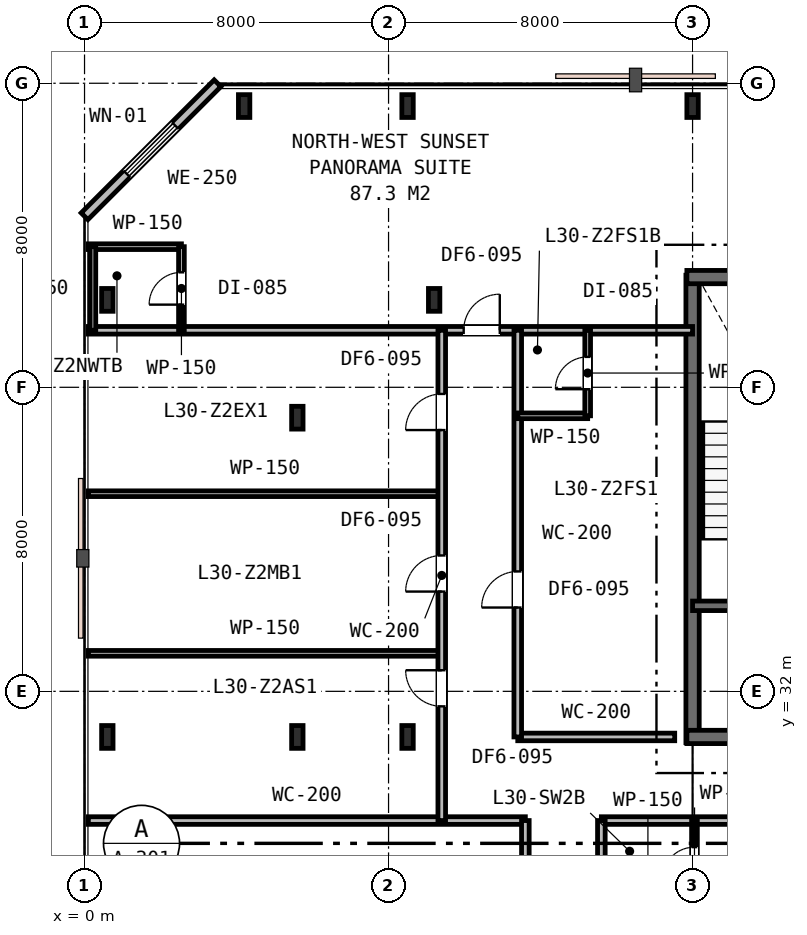
"""IFC4 building model, lengths in metres.
Left out: names, types, materials, properties, quantities, classifications, styles, units other than length and angle.
Written with IfcOpenShell. Run it as: python <this file> out.ifc"""

import sys

from ifc_helpers import new_model, si_unit, direction, frame, frame_2d, origin, origin_2d, place, context, subcontext, project, spatial, rectangle, i_section, extrude, element, fill, save


model = new_model("IFC4")
c1 = context("Model", 3, precision=1e-05, world=origin(), true_north=direction((0.0, 1.0)))
c2 = subcontext(c1, "Body", "Model", "MODEL_VIEW")
j1 = project(units=[si_unit("LENGTHUNIT", "METRE"), si_unit("PLANEANGLEUNIT", "RADIAN")], contexts=[c1])
p1 = place(None, origin())
s1 = spatial("IfcSite", under=j1, at=p1, CompositionType="ELEMENT")
p2 = place(p1, origin())
s2 = spatial("IfcBuilding", under=s1, at=p2, CompositionType="ELEMENT")
p3 = place(p2, frame((0.0, 0.0, 118.8)))
s3 = spatial("IfcBuildingStorey", under=s2, at=p3, CompositionType="ELEMENT", Elevation=118.8)
p4 = place(p3, frame((16.0, 30.65, 0.0), z_axis=(0.0, 0.0, 1.0), x_axis=(0.0, 1.0, 0.0)))
e1 = element("IfcWall", 1, at=p4, inside=s3, PredefinedType="SHEAR", context=c2, shape_type="SweptSolid", body=[
    extrude(rectangle(XDim=12.3, YDim=0.35, at=frame_2d((6.15, 0.0))), origin(), (0.0, 0.0, 1.0), 3.6),
])
p5 = place(p3, frame((15.85, 42.9, 0.0), z_axis=(0.0, 0.0, 1.0), x_axis=(1.0, 0.0, 0.0)))
e2 = element("IfcWall", 2, at=p5, inside=s3, PredefinedType="SHEAR", context=c2, shape_type="SweptSolid", body=[
    extrude(rectangle(XDim=24.3, YDim=0.35, at=frame_2d((12.15, 0.0))), origin(), (0.0, 0.0, 1.0), 3.6),
])
p6 = place(p3, frame((15.85, 30.8, 0.0), z_axis=(0.0, 0.0, 1.0), x_axis=(1.0, 0.0, 0.0)))
e3 = element("IfcWall", 3, at=p6, inside=s3, PredefinedType="SHEAR", context=c2, shape_type="SweptSolid", body=[
    extrude(rectangle(XDim=11.2, YDim=0.35, at=frame_2d((5.6, 0.0))), origin(), (0.0, 0.0, 1.0), 3.6),
])
p7 = place(p6, frame((2.45, 0.0, 0.0)))
e4 = element("IfcOpeningElement", 4, at=p7, cuts=e3, PredefinedType="OPENING", context=c2, shape_type="SweptSolid", body=[
    extrude(rectangle(XDim=1.1, YDim=2.15, at=frame_2d((0.55, 1.075))), frame((0.0, 0.185, 0.0), z_axis=(0.0, -1.0, 0.0), x_axis=(1.0, 0.0, 0.0)), (0.0, 0.0, 1.0), 0.37),
])
p8 = place(p3, frame((16.0, 34.25, 0.0), z_axis=(0.0, 0.0, 1.0), x_axis=(1.0, 0.0, 0.0)))
e5 = element("IfcWall", 5, at=p8, inside=s3, PredefinedType="SHEAR", context=c2, shape_type="SweptSolid", body=[
    extrude(rectangle(XDim=6.05, YDim=0.25, at=frame_2d((3.025, 0.0))), origin(), (0.0, 0.0, 1.0), 3.6),
])
p9 = place(p8, frame((1.25, 0.0, 0.0)))
e6 = element("IfcOpeningElement", 6, at=p9, cuts=e5, PredefinedType="OPENING", context=c2, shape_type="SweptSolid", body=[
    extrude(rectangle(XDim=1.0, YDim=2.15, at=frame_2d((0.5, 1.075))), frame((0.0, 0.135, 0.0), z_axis=(0.0, -1.0, 0.0), x_axis=(1.0, 0.0, 0.0)), (0.0, 0.0, 1.0), 0.27),
])
p10 = place(p8, frame((4.2, 0.0, 0.0)))
e7 = element("IfcOpeningElement", 7, at=p10, cuts=e5, PredefinedType="OPENING", context=c2, shape_type="SweptSolid", body=[
    extrude(rectangle(XDim=1.1, YDim=2.15, at=frame_2d((0.55, 1.075))), frame((0.0, 0.135, 0.0), z_axis=(0.0, -1.0, 0.0), x_axis=(1.0, 0.0, 0.0)), (0.0, 0.0, 1.0), 0.27),
])
for number, where, z_axis, x_axis in (
    (8, (5.6, 30.8, 0.0), (0.0, 0.0, 1.0), (1.0, 0.0, 0.0)),
    (9, (5.6, 39.2, 0.0), (0.0, 0.0, 1.0), (1.0, 0.0, 0.0)),
    (10, (8.5, 30.8, 0.0), (0.0, 0.0, 1.0), (1.0, 0.0, 0.0)),
    (11, (9.2, 42.3, 0.0), (0.0, 0.0, 1.0), (1.0, 0.0, 0.0)),
    (12, (0.6, 30.8, 0.0), (0.0, 0.0, 1.0), (1.0, 0.0, 0.0)),
    (13, (0.6, 42.3, 0.0), (0.0, 0.0, 1.0), (1.0, 0.0, 0.0)),
    (14, (4.2, 47.4, 0.0), (0.0, 0.0, 1.0), (1.0, 0.0, 0.0)),
    (15, (8.5, 47.4, 0.0), (0.0, 0.0, 1.0), (1.0, 0.0, 0.0)),
    (16, (16.0, 47.4, 0.0), (0.0, 0.0, 1.0), (1.0, 0.0, 0.0)),
):
    element("IfcColumn", number, at=place(p3, frame(where, z_axis=z_axis, x_axis=x_axis)), inside=s3, PredefinedType="COLUMN", context=c2, shape_type="SweptSolid", body=[
        extrude(i_section(OverallWidth=0.3, OverallDepth=0.6, WebThickness=0.015, FlangeThickness=0.03, FilletRadius=0.027, at=origin_2d()), origin(), (0.0, 0.0, 1.0), 3.6),
    ])
p11 = place(p3, frame((3.5, 48.0, 0.0), z_axis=(0.0, 0.0, 1.0), x_axis=(-0.707106781187, -0.707106781187, 0.0)))
e17 = element("IfcWall", 17, at=p11, inside=s3, PredefinedType="STANDARD", context=c2, shape_type="SweptSolid", body=[
    extrude(rectangle(XDim=4.95, YDim=0.25, at=frame_2d((2.475, 0.0))), origin(), (0.0, 0.0, 1.0), 3.33),
])
p12 = place(p11, frame((1.575, 0.0, 0.75)))
e18 = element("IfcOpeningElement", 18, at=p12, cuts=e17, PredefinedType="OPENING", context=c2, shape_type="SweptSolid", body=[
    extrude(rectangle(XDim=1.8, YDim=1.85, at=frame_2d((0.9, 0.925))), frame((0.0, 0.135, 0.0), z_axis=(0.0, -1.0, 0.0), x_axis=(1.0, 0.0, 0.0)), (0.0, 0.0, 1.0), 0.27),
])
p13 = place(p3, frame((0.1, 28.6, 0.0), z_axis=(0.0, 0.0, 1.0), x_axis=(1.0, 0.0, 0.0)))
e19 = element("IfcWall", 19, at=p13, inside=s3, PredefinedType="PARTITIONING", context=c2, shape_type="SweptSolid", body=[
    extrude(rectangle(XDim=11.5, YDim=0.2, at=frame_2d((5.75, 0.0))), origin(), (0.0, 0.0, 1.0), 2.87),
])
p14 = place(p3, frame((13.6, 28.6, 0.0), z_axis=(0.0, 0.0, 1.0), x_axis=(1.0, 0.0, 0.0)))
e20 = element("IfcWall", 20, at=p14, inside=s3, PredefinedType="PARTITIONING", context=c2, shape_type="SweptSolid", body=[
    extrude(rectangle(XDim=30.6, YDim=0.2, at=frame_2d((15.3, 0.0))), origin(), (0.0, 0.0, 1.0), 2.87),
])
p15 = place(p14, frame((13.325, 0.0, 0.0)))
e21 = element("IfcOpeningElement", 21, at=p15, cuts=e20, PredefinedType="OPENING", context=c2, shape_type="SweptSolid", body=[
    extrude(rectangle(XDim=0.95, YDim=2.15, at=frame_2d((0.475, 1.075))), frame((0.0, 0.11, 0.0), z_axis=(0.0, -1.0, 0.0), x_axis=(1.0, 0.0, 0.0)), (0.0, 0.0, 1.0), 0.22),
])
p16 = place(p14, frame((18.761, 0.0, 0.0)))
e22 = element("IfcOpeningElement", 22, at=p16, cuts=e20, PredefinedType="OPENING", context=c2, shape_type="SweptSolid", body=[
    extrude(rectangle(XDim=0.95, YDim=2.15, at=frame_2d((0.475, 1.075))), frame((0.0, 0.11, 0.0), z_axis=(0.0, -1.0, 0.0), x_axis=(1.0, 0.0, 0.0)), (0.0, 0.0, 1.0), 0.22),
])
p17 = place(p14, frame((25.503, 0.0, 0.0)))
e23 = element("IfcOpeningElement", 23, at=p17, cuts=e20, PredefinedType="OPENING", context=c2, shape_type="SweptSolid", body=[
    extrude(rectangle(XDim=0.95, YDim=2.15, at=frame_2d((0.475, 1.075))), frame((0.0, 0.11, 0.0), z_axis=(0.0, -1.0, 0.0), x_axis=(1.0, 0.0, 0.0)), (0.0, 0.0, 1.0), 0.22),
])
p18 = place(p3, frame((11.4, 30.8, 0.0), z_axis=(0.0, 0.0, 1.0), x_axis=(1.0, 0.0, 0.0)))
e24 = element("IfcWall", 24, at=p18, inside=s3, PredefinedType="PARTITIONING", context=c2, shape_type="SweptSolid", body=[
    extrude(rectangle(XDim=4.13, YDim=0.2, at=frame_2d((2.065, 0.0))), origin(), (0.0, 0.0, 1.0), 2.87),
])
p19 = place(p3, frame((11.6, 10.6, 0.0), z_axis=(0.0, 0.0, 1.0), x_axis=(0.0, 1.0, 0.0)))
e25 = element("IfcWall", 25, at=p19, inside=s3, PredefinedType="PARTITIONING", context=c2, shape_type="SweptSolid", body=[
    extrude(rectangle(XDim=18.0, YDim=0.2, at=frame_2d((9.0, 0.0))), origin(), (0.0, 0.0, 1.0), 2.87),
])
p20 = place(p19, frame((8.425, 0.0, 0.0)))
e26 = element("IfcOpeningElement", 26, at=p20, cuts=e25, PredefinedType="OPENING", context=c2, shape_type="SweptSolid", body=[
    extrude(rectangle(XDim=0.95, YDim=2.15, at=frame_2d((0.475, 1.075))), frame((0.0, 0.11, 0.0), z_axis=(0.0, -1.0, 0.0), x_axis=(1.0, 0.0, 0.0)), (0.0, 0.0, 1.0), 0.22),
])
p21 = place(p19, frame((13.725, 0.0, 0.0)))
e27 = element("IfcOpeningElement", 27, at=p21, cuts=e25, PredefinedType="OPENING", context=c2, shape_type="SweptSolid", body=[
    extrude(rectangle(XDim=0.95, YDim=2.15, at=frame_2d((0.475, 1.075))), frame((0.0, 0.11, 0.0), z_axis=(0.0, -1.0, 0.0), x_axis=(1.0, 0.0, 0.0)), (0.0, 0.0, 1.0), 0.22),
])
p22 = place(p19, frame((3.225, 0.0, 0.0)))
e28 = element("IfcOpeningElement", 28, at=p22, cuts=e25, PredefinedType="OPENING", context=c2, shape_type="SweptSolid", body=[
    extrude(rectangle(XDim=0.95, YDim=2.15, at=frame_2d((0.475, 1.075))), frame((0.0, 0.11, 0.0), z_axis=(0.0, -1.0, 0.0), x_axis=(1.0, 0.0, 0.0)), (0.0, 0.0, 1.0), 0.22),
])
p23 = place(p3, frame((0.1, 41.5, 0.0), z_axis=(0.0, 0.0, 1.0), x_axis=(1.0, 0.0, 0.0)))
e29 = element("IfcWall", 29, at=p23, inside=s3, PredefinedType="PARTITIONING", context=c2, shape_type="SweptSolid", body=[
    extrude(rectangle(XDim=15.9, YDim=0.2, at=frame_2d((7.95, 0.0))), origin(), (0.0, 0.0, 1.0), 2.87),
])
p24 = place(p23, frame((9.877, 0.0, 0.0)))
e30 = element("IfcOpeningElement", 30, at=p24, cuts=e29, PredefinedType="OPENING", context=c2, shape_type="SweptSolid", body=[
    extrude(rectangle(XDim=0.95, YDim=2.15, at=frame_2d((0.475, 1.075))), frame((0.0, 0.11, 0.0), z_axis=(0.0, -1.0, 0.0), x_axis=(1.0, 0.0, 0.0)), (0.0, 0.0, 1.0), 0.22),
])
p25 = place(p3, frame((0.1, 43.7, 0.0), z_axis=(0.0, 0.0, 1.0), x_axis=(1.0, 0.0, 0.0)))
e31 = element("IfcWall", 31, at=p25, inside=s3, PredefinedType="PARTITIONING", context=c2, shape_type="SweptSolid", body=[
    extrude(rectangle(XDim=2.45, YDim=0.15, at=frame_2d((1.225, 0.0))), origin(), (0.0, 0.0, 1.0), 3.33),
])
p26 = place(p3, frame((2.55, 41.5, 0.0), z_axis=(0.0, 0.0, 1.0), x_axis=(0.0, 1.0, 0.0)))
e32 = element("IfcWall", 32, at=p26, inside=s3, PredefinedType="PARTITIONING", context=c2, shape_type="SweptSolid", body=[
    extrude(rectangle(XDim=2.2, YDim=0.15, at=frame_2d((1.1, 0.0))), origin(), (0.0, 0.0, 1.0), 2.87),
])
p27 = place(p26, frame((0.675, 0.0, 0.0)))
e33 = element("IfcOpeningElement", 33, at=p27, cuts=e32, PredefinedType="OPENING", context=c2, shape_type="SweptSolid", body=[
    extrude(rectangle(XDim=0.85, YDim=2.15, at=frame_2d((0.425, 1.075))), frame((0.0, 0.085, 0.0), z_axis=(0.0, -1.0, 0.0), x_axis=(1.0, 0.0, 0.0)), (0.0, 0.0, 1.0), 0.17),
])
p28 = place(p3, frame((0.22, 41.5, 0.0), z_axis=(0.0, 0.0, 1.0), x_axis=(0.0, 1.0, 0.0)))
e34 = element("IfcWall", 34, at=p28, inside=s3, PredefinedType="PARTITIONING", context=c2, shape_type="SweptSolid", body=[
    extrude(rectangle(XDim=2.2, YDim=0.15, at=frame_2d((1.1, 0.0))), origin(), (0.0, 0.0, 1.0), 2.87),
])
for number, where, z_axis, x_axis in (
    (35, (0.1, 33.0, 0.0), (0.0, 0.0, 1.0), (1.0, 0.0, 0.0)),
    (36, (0.1, 37.2, 0.0), (0.0, 0.0, 1.0), (1.0, 0.0, 0.0)),
):
    element("IfcWall", number, at=place(p3, frame(where, z_axis=z_axis, x_axis=x_axis)), inside=s3, PredefinedType="PARTITIONING", context=c2, shape_type="SweptSolid", body=[
        extrude(rectangle(XDim=9.3, YDim=0.15, at=frame_2d((4.65, 0.0))), origin(), (0.0, 0.0, 1.0), 2.87),
    ])
p29 = place(p3, frame((9.4, 28.6, 0.0), z_axis=(0.0, 0.0, 1.0), x_axis=(0.0, 1.0, 0.0)))
e37 = element("IfcWall", 37, at=p29, inside=s3, PredefinedType="PARTITIONING", context=c2, shape_type="SweptSolid", body=[
    extrude(rectangle(XDim=12.9, YDim=0.2, at=frame_2d((6.45, 0.0))), origin(), (0.0, 0.0, 1.0), 2.87),
])
p30 = place(p29, frame((3.005, 0.0, 0.0)))
e38 = element("IfcOpeningElement", 38, at=p30, cuts=e37, PredefinedType="OPENING", context=c2, shape_type="SweptSolid", body=[
    extrude(rectangle(XDim=0.95, YDim=2.15, at=frame_2d((0.475, 1.075))), frame((0.0, 0.11, 0.0), z_axis=(0.0, -1.0, 0.0), x_axis=(1.0, 0.0, 0.0)), (0.0, 0.0, 1.0), 0.22),
])
p31 = place(p29, frame((6.025, 0.0, 0.0)))
e39 = element("IfcOpeningElement", 39, at=p31, cuts=e37, PredefinedType="OPENING", context=c2, shape_type="SweptSolid", body=[
    extrude(rectangle(XDim=0.95, YDim=2.15, at=frame_2d((0.475, 1.075))), frame((0.0, 0.11, 0.0), z_axis=(0.0, -1.0, 0.0), x_axis=(1.0, 0.0, 0.0)), (0.0, 0.0, 1.0), 0.22),
])
p32 = place(p29, frame((10.275, 0.0, 0.0)))
e40 = element("IfcOpeningElement", 40, at=p32, cuts=e37, PredefinedType="OPENING", context=c2, shape_type="SweptSolid", body=[
    extrude(rectangle(XDim=0.95, YDim=2.15, at=frame_2d((0.475, 1.075))), frame((0.0, 0.11, 0.0), z_axis=(0.0, -1.0, 0.0), x_axis=(1.0, 0.0, 0.0)), (0.0, 0.0, 1.0), 0.22),
])
p33 = place(p3, frame((11.4, 30.8, 0.0), z_axis=(0.0, 0.0, 1.0), x_axis=(0.0, 1.0, 0.0)))
e41 = element("IfcWall", 41, at=p33, inside=s3, PredefinedType="PARTITIONING", context=c2, shape_type="SweptSolid", body=[
    extrude(rectangle(XDim=10.7, YDim=0.2, at=frame_2d((5.35, 0.0))), origin(), (0.0, 0.0, 1.0), 2.87),
])
p34 = place(p33, frame((3.405, 0.0, 0.0)))
e42 = element("IfcOpeningElement", 42, at=p34, cuts=e41, PredefinedType="OPENING", context=c2, shape_type="SweptSolid", body=[
    extrude(rectangle(XDim=0.95, YDim=2.15, at=frame_2d((0.475, 1.075))), frame((0.0, 0.11, 0.0), z_axis=(0.0, -1.0, 0.0), x_axis=(1.0, 0.0, 0.0)), (0.0, 0.0, 1.0), 0.22),
])
p35 = place(p3, frame((11.4, 39.25, 0.0), z_axis=(0.0, 0.0, 1.0), x_axis=(1.0, 0.0, 0.0)))
e43 = element("IfcWall", 43, at=p35, inside=s3, PredefinedType="PARTITIONING", context=c2, shape_type="SweptSolid", body=[
    extrude(rectangle(XDim=1.84, YDim=0.15, at=frame_2d((0.92, 0.0))), origin(), (0.0, 0.0, 1.0), 3.33),
])
p36 = place(p3, frame((13.24, 39.25, 0.0), z_axis=(0.0, 0.0, 1.0), x_axis=(0.0, 1.0, 0.0)))
e44 = element("IfcWall", 44, at=p36, inside=s3, PredefinedType="PARTITIONING", context=c2, shape_type="SweptSolid", body=[
    extrude(rectangle(XDim=2.25, YDim=0.15, at=frame_2d((1.125, 0.0))), origin(), (0.0, 0.0, 1.0), 3.33),
])
p37 = place(p36, frame((0.7, 0.0, 0.0)))
e45 = element("IfcOpeningElement", 45, at=p37, cuts=e44, PredefinedType="OPENING", context=c2, shape_type="SweptSolid", body=[
    extrude(rectangle(XDim=0.85, YDim=2.15, at=frame_2d((0.425, 1.075))), frame((0.0, 0.085, 0.0), z_axis=(0.0, -1.0, 0.0), x_axis=(1.0, 0.0, 0.0)), (0.0, 0.0, 1.0), 0.17),
])
p38 = place(p3, frame((13.6, 10.6, 0.0), z_axis=(0.0, 0.0, 1.0), x_axis=(0.0, 1.0, 0.0)))
e46 = element("IfcWall", 46, at=p38, inside=s3, PredefinedType="PARTITIONING", context=c2, shape_type="SweptSolid", body=[
    extrude(rectangle(XDim=18.0, YDim=0.2, at=frame_2d((9.0, 0.0))), origin(), (0.0, 0.0, 1.0), 2.87),
])
p39 = place(p38, frame((4.24, 0.0, 0.0)))
e47 = element("IfcOpeningElement", 47, at=p39, cuts=e46, PredefinedType="OPENING", context=c2, shape_type="SweptSolid", body=[
    extrude(rectangle(XDim=0.95, YDim=2.15, at=frame_2d((0.475, 1.075))), frame((0.0, 0.11, 0.0), z_axis=(0.0, -1.0, 0.0), x_axis=(1.0, 0.0, 0.0)), (0.0, 0.0, 1.0), 0.22),
])
p40 = place(p38, frame((11.494, 0.0, 0.0)))
e48 = element("IfcOpeningElement", 48, at=p40, cuts=e46, PredefinedType="OPENING", context=c2, shape_type="SweptSolid", body=[
    extrude(rectangle(XDim=0.95, YDim=2.15, at=frame_2d((0.475, 1.075))), frame((0.0, 0.11, 0.0), z_axis=(0.0, -1.0, 0.0), x_axis=(1.0, 0.0, 0.0)), (0.0, 0.0, 1.0), 0.22),
])
p41 = place(p3, frame((16.05, 26.35, 0.0), z_axis=(0.0, 0.0, 1.0), x_axis=(0.0, 1.0, 0.0)))
e49 = element("IfcWall", 49, at=p41, inside=s3, PredefinedType="PARTITIONING", context=c2, shape_type="SweptSolid", body=[
    extrude(rectangle(XDim=2.25, YDim=0.15, at=frame_2d((1.125, 0.0))), origin(), (0.0, 0.0, 1.0), 2.87),
])
p42 = place(p41, frame((0.7, 0.0, 0.0)))
e50 = element("IfcOpeningElement", 50, at=p42, cuts=e49, PredefinedType="OPENING", context=c2, shape_type="SweptSolid", body=[
    extrude(rectangle(XDim=0.85, YDim=2.15, at=frame_2d((0.425, 1.075))), frame((0.0, 0.085, 0.0), z_axis=(0.0, -1.0, 0.0), x_axis=(1.0, 0.0, 0.0)), (0.0, 0.0, 1.0), 0.17),
])
p43 = place(p12, origin())
e51 = element("IfcWindow", 51, at=p43, inside=s3, PartitioningType="SINGLE_PANEL", PredefinedType="WINDOW", context=c2, shape_type="SweptSolid", body=[
    extrude(rectangle(XDim=1.8, YDim=1.85, at=frame_2d((0.9, 0.925))), frame((0.0, 0.03, 0.0), z_axis=(0.0, -1.0, 0.0), x_axis=(1.0, 0.0, 0.0)), (0.0, 0.0, 1.0), 0.06),
])
fill(e18, e51)
p44 = place(p24, origin())
e52 = element("IfcDoor", 52, at=p44, inside=s3, OperationType="SINGLE_SWING_RIGHT", PredefinedType="DOOR", context=c2, shape_type="SweptSolid", body=[
    extrude(rectangle(XDim=0.95, YDim=2.15, at=frame_2d((0.475, 1.075))), frame((0.0, 0.025, 0.0), z_axis=(0.0, -1.0, 0.0), x_axis=(1.0, 0.0, 0.0)), (0.0, 0.0, 1.0), 0.05),
])
fill(e30, e52)
p45 = place(p27, origin())
e53 = element("IfcDoor", 53, at=p45, inside=s3, OperationType="SINGLE_SWING_LEFT", PredefinedType="DOOR", context=c2, shape_type="SweptSolid", body=[
    extrude(rectangle(XDim=0.85, YDim=2.15, at=frame_2d((0.425, 1.075))), frame((0.0, 0.025, 0.0), z_axis=(0.0, -1.0, 0.0), x_axis=(1.0, 0.0, 0.0)), (0.0, 0.0, 1.0), 0.05),
])
fill(e33, e53)
p46 = place(p30, origin())
e54 = element("IfcDoor", 54, at=p46, inside=s3, OperationType="SINGLE_SWING_RIGHT", PredefinedType="DOOR", context=c2, shape_type="SweptSolid", body=[
    extrude(rectangle(XDim=0.95, YDim=2.15, at=frame_2d((0.475, 1.075))), frame((0.0, 0.025, 0.0), z_axis=(0.0, -1.0, 0.0), x_axis=(1.0, 0.0, 0.0)), (0.0, 0.0, 1.0), 0.05),
])
fill(e38, e54)
p47 = place(p31, origin())
e55 = element("IfcDoor", 55, at=p47, inside=s3, OperationType="SINGLE_SWING_LEFT", PredefinedType="DOOR", context=c2, shape_type="SweptSolid", body=[
    extrude(rectangle(XDim=0.95, YDim=2.15, at=frame_2d((0.475, 1.075))), frame((0.0, 0.025, 0.0), z_axis=(0.0, -1.0, 0.0), x_axis=(1.0, 0.0, 0.0)), (0.0, 0.0, 1.0), 0.05),
])
fill(e39, e55)
p48 = place(p32, origin())
e56 = element("IfcDoor", 56, at=p48, inside=s3, OperationType="SINGLE_SWING_LEFT", PredefinedType="DOOR", context=c2, shape_type="SweptSolid", body=[
    extrude(rectangle(XDim=0.95, YDim=2.15, at=frame_2d((0.475, 1.075))), frame((0.0, 0.025, 0.0), z_axis=(0.0, -1.0, 0.0), x_axis=(1.0, 0.0, 0.0)), (0.0, 0.0, 1.0), 0.05),
])
fill(e40, e56)
p49 = place(p34, origin())
e57 = element("IfcDoor", 57, at=p49, inside=s3, OperationType="SINGLE_SWING_LEFT", PredefinedType="DOOR", context=c2, shape_type="SweptSolid", body=[
    extrude(rectangle(XDim=0.95, YDim=2.15, at=frame_2d((0.475, 1.075))), frame((0.0, 0.025, 0.0), z_axis=(0.0, -1.0, 0.0), x_axis=(1.0, 0.0, 0.0)), (0.0, 0.0, 1.0), 0.05),
])
fill(e42, e57)
p50 = place(p37, origin())
e58 = element("IfcDoor", 58, at=p50, inside=s3, OperationType="SINGLE_SWING_LEFT", PredefinedType="DOOR", context=c2, shape_type="SweptSolid", body=[
    extrude(rectangle(XDim=0.85, YDim=2.15, at=frame_2d((0.425, 1.075))), frame((0.0, 0.025, 0.0), z_axis=(0.0, -1.0, 0.0), x_axis=(1.0, 0.0, 0.0)), (0.0, 0.0, 1.0), 0.05),
])
fill(e45, e58)
p51 = place(p42, origin())
e59 = element("IfcDoor", 59, at=p51, inside=s3, OperationType="SINGLE_SWING_LEFT", PredefinedType="DOOR", context=c2, shape_type="SweptSolid", body=[
    extrude(rectangle(XDim=0.85, YDim=2.15, at=frame_2d((0.425, 1.075))), frame((0.0, 0.025, 0.0), z_axis=(0.0, -1.0, 0.0), x_axis=(1.0, 0.0, 0.0)), (0.0, 0.0, 1.0), 0.05),
])
fill(e50, e59)
save(model, sys.argv[1])
